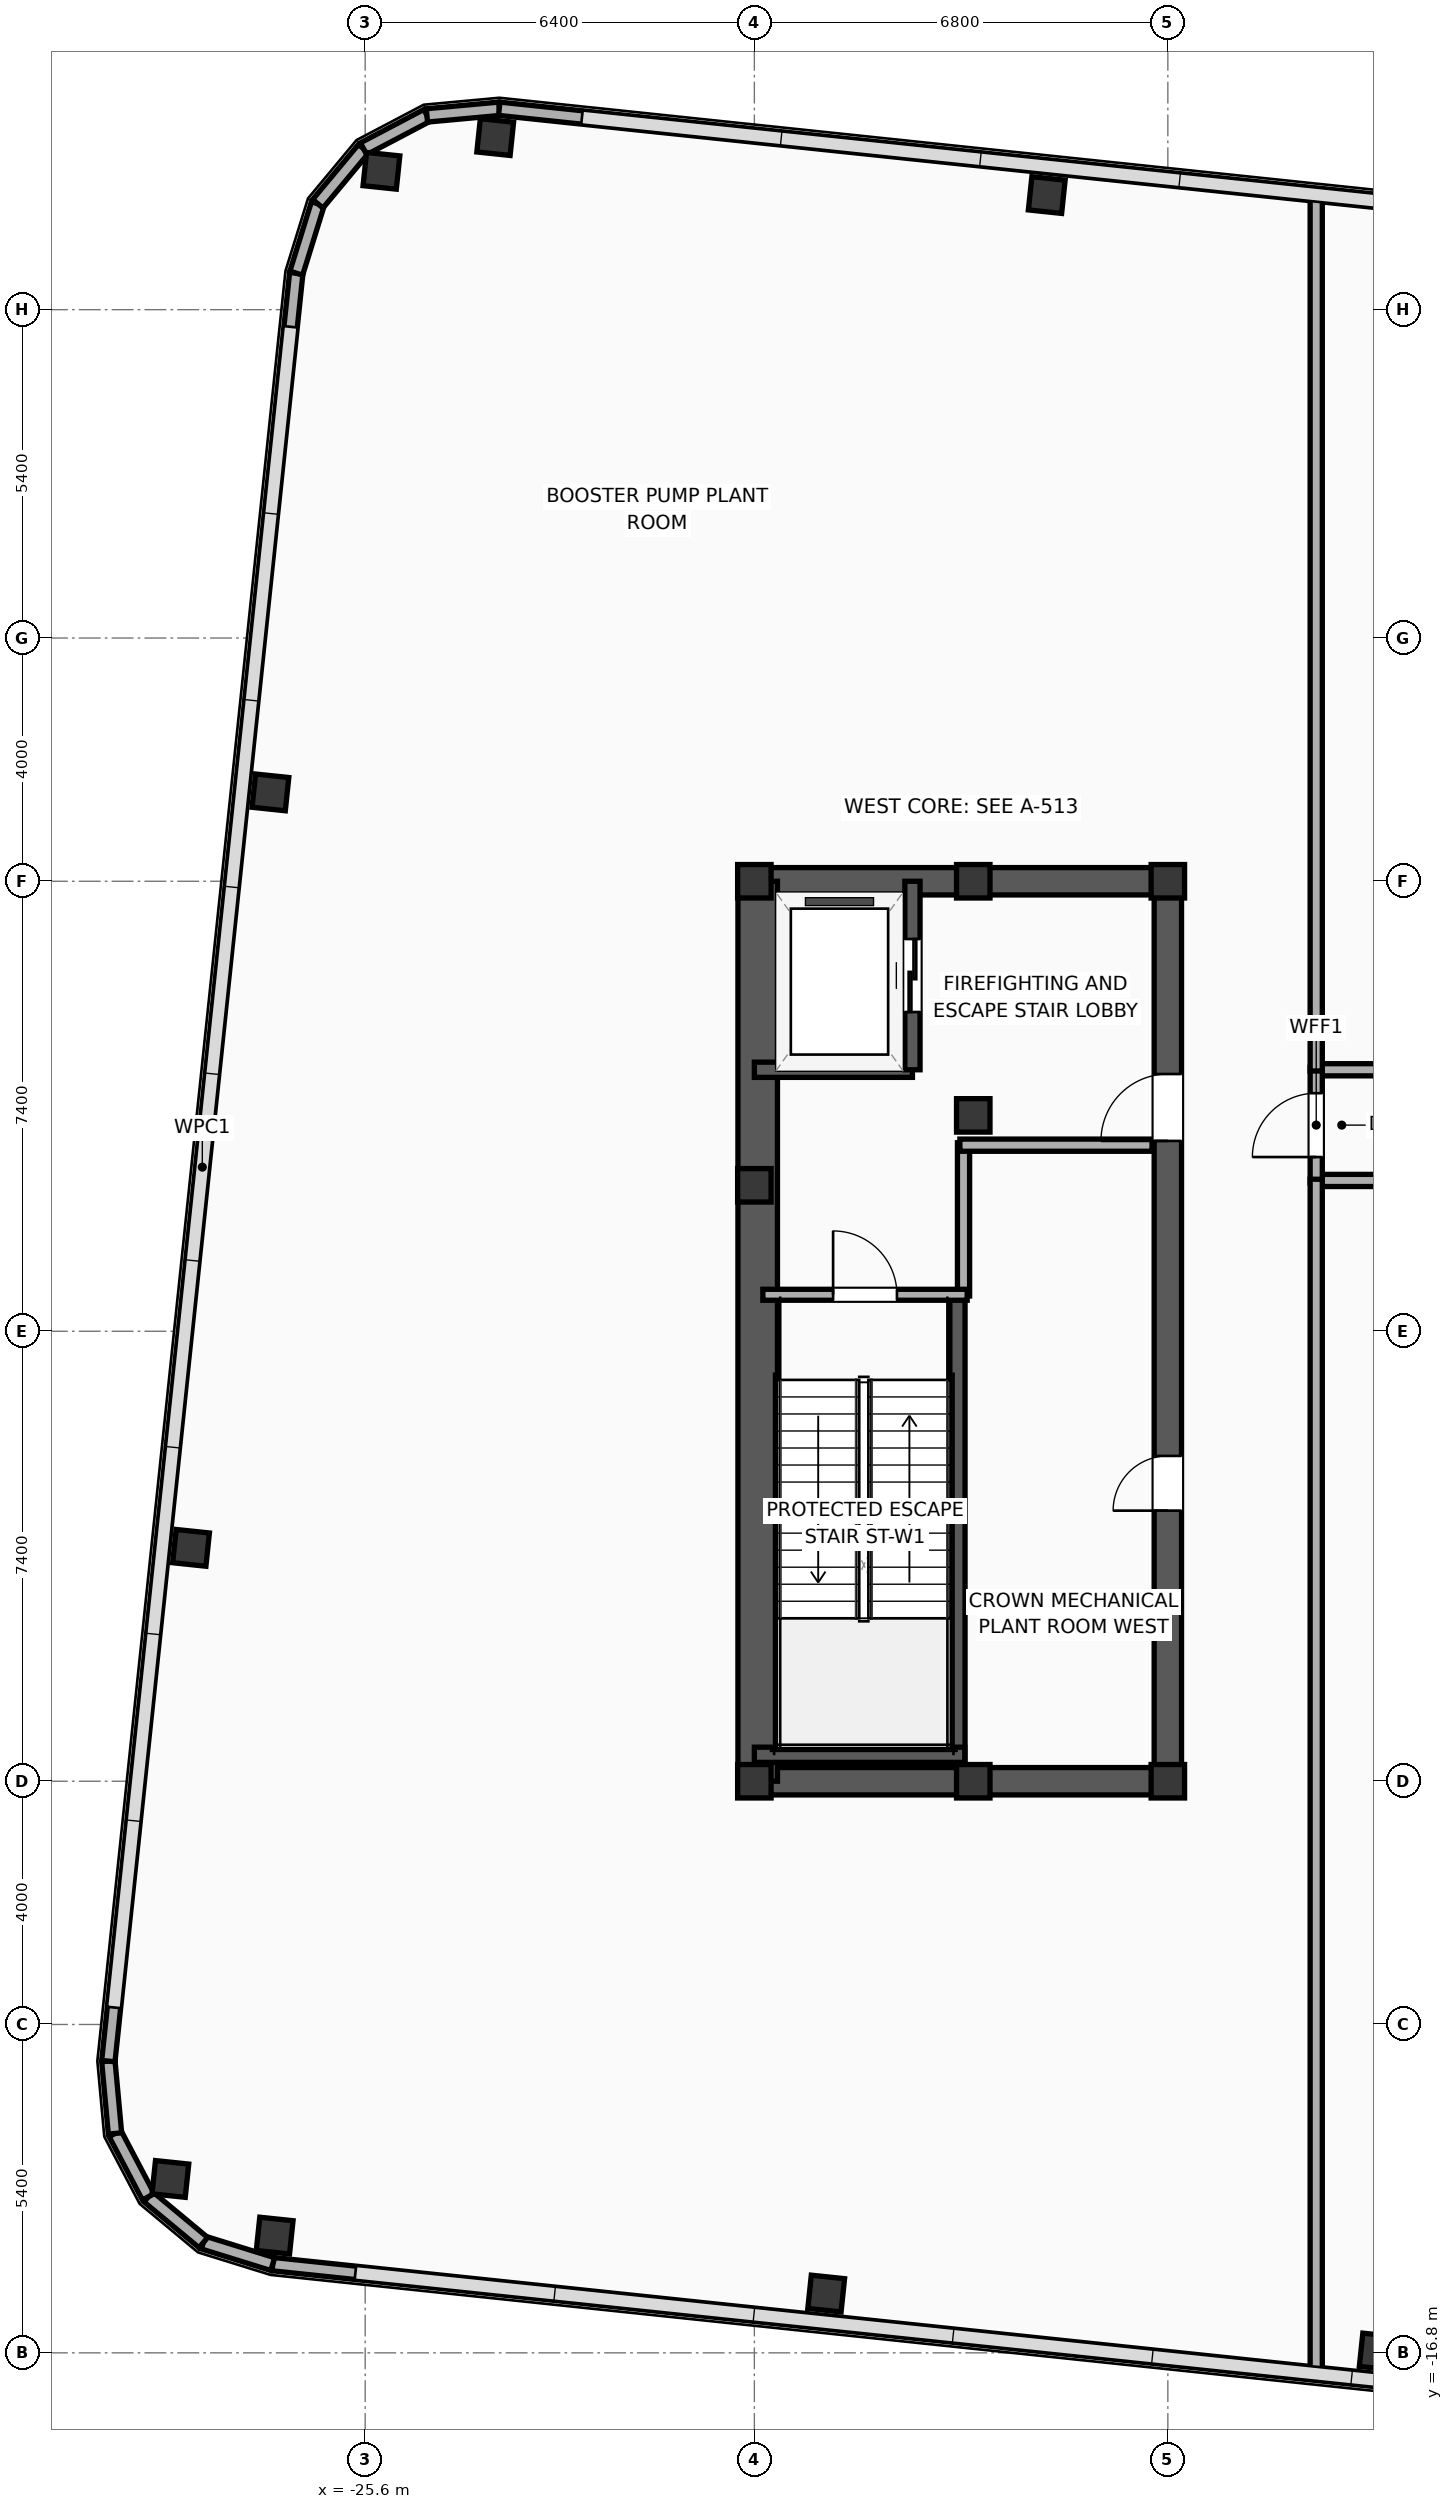
"""IFC4 building model, lengths in metres.
Left out: names, types, materials, properties, quantities, classifications, styles, units other than length and angle.
Written with IfcOpenShell. Run it as: python <this file> out.ifc"""

import sys

from ifc_helpers import new_model, si_unit, direction, frame, frame_2d, origin, origin_2d, place, context, subcontext, project, spatial, rectangle, hollow_rectangle, extrude, element, fill, save


model = new_model("IFC4")
c1 = context("Model", 3, precision=1e-05, world=origin(), true_north=direction((0.0, 1.0)))
c2 = subcontext(c1, "Body", "Model", "MODEL_VIEW")
j1 = project(units=[si_unit("LENGTHUNIT", "METRE"), si_unit("PLANEANGLEUNIT", "RADIAN")], contexts=[c1])
p1 = place(None, origin())
s1 = spatial("IfcSite", under=j1, at=p1, CompositionType="ELEMENT")
p2 = place(p1, origin())
s2 = spatial("IfcBuilding", under=s1, at=p2, CompositionType="ELEMENT")
p3 = place(p2, frame((0.0, 0.0, 321.3)))
s3 = spatial("IfcBuildingStorey", under=s2, at=p3, CompositionType="ELEMENT", Elevation=321.3)
for number, where, z_axis, x_axis in (
    (1, (-19.2, -7.4, 0.0), (0.0, 0.0, 1.0), (1.0, 0.0, 0.0)),
    (2, (-19.2, 2.4, 0.0), (0.0, 0.0, 1.0), (1.0, 0.0, 0.0)),
    (3, (-19.2, 7.4, 0.0), (0.0, 0.0, 1.0), (1.0, 0.0, 0.0)),
    (4, (-15.6, -7.4, 0.0), (0.0, 0.0, 1.0), (1.0, 0.0, 0.0)),
    (5, (-15.6, 7.4, 0.0), (0.0, 0.0, 1.0), (1.0, 0.0, 0.0)),
    (6, (-12.4, -7.4, 0.0), (0.0, 0.0, 1.0), (1.0, 0.0, 0.0)),
    (7, (-15.6, 3.55, 0.0), (0.0, 0.0, 1.0), (1.0, 0.0, 0.0)),
    (8, (-12.4, 7.4, 0.0), (0.0, 0.0, 1.0), (1.0, 0.0, 0.0)),
):
    element("IfcColumn", number, at=place(p3, frame(where, z_axis=z_axis, x_axis=x_axis)), inside=s3, PredefinedType="COLUMN", context=c2, shape_type="SweptSolid", body=[
        extrude(hollow_rectangle(XDim=0.55, YDim=0.55, WallThickness=0.022, at=origin_2d()), origin(), (0.0, 0.0, 1.0), 5.3),
    ])
for number, where, z_axis, x_axis in (
    (9, (-19.425, -7.4, 0.0), (0.0, 0.0, 1.0), (1.0, 0.0, 0.0)),
    (10, (-19.425, 7.4, 0.0), (0.0, 0.0, 1.0), (1.0, 0.0, 0.0)),
):
    element("IfcWall", number, at=place(p3, frame(where, z_axis=z_axis, x_axis=x_axis)), inside=s3, PredefinedType="SHEAR", context=c2, shape_type="SweptSolid", body=[
        extrude(rectangle(XDim=7.25, YDim=0.45, at=frame_2d((3.625, 0.0))), origin(), (0.0, 0.0, 1.0), 5.025),
    ])
p4 = place(p3, frame((-19.145, -7.4, 0.0), z_axis=(0.0, 0.0, 1.0), x_axis=(0.0, 1.0, 0.0)))
e11 = element("IfcWall", 11, at=p4, inside=s3, PredefinedType="SHEAR", context=c2, shape_type="SweptSolid", body=[
    extrude(rectangle(XDim=14.8, YDim=0.65, at=frame_2d((7.4, 0.0))), origin(), (0.0, 0.0, 1.0), 5.025),
])
p5 = place(p3, frame((-12.4, -7.4, 0.0), z_axis=(0.0, 0.0, 1.0), x_axis=(0.0, 1.0, 0.0)))
e12 = element("IfcWall", 12, at=p5, inside=s3, PredefinedType="SHEAR", context=c2, shape_type="SweptSolid", body=[
    extrude(rectangle(XDim=14.8, YDim=0.45, at=frame_2d((7.4, 0.0))), origin(), (0.0, 0.0, 1.0), 5.025),
])
p6 = place(p5, frame((10.53, 0.0, 0.0)))
e13 = element("IfcOpeningElement", 13, at=p6, cuts=e12, PredefinedType="OPENING", context=c2, shape_type="SweptSolid", body=[
    extrude(rectangle(XDim=1.1, YDim=2.05, at=frame_2d((0.55, 1.025))), frame((0.0, 0.235, 0.0), z_axis=(0.0, -1.0, 0.0), x_axis=(1.0, 0.0, 0.0)), (0.0, 0.0, 1.0), 0.47),
])
p7 = place(p5, frame((4.45, 0.0, 0.0)))
e14 = element("IfcOpeningElement", 14, at=p7, cuts=e12, PredefinedType="OPENING", context=c2, shape_type="SweptSolid", body=[
    extrude(rectangle(XDim=0.9, YDim=2.05, at=frame_2d((0.45, 1.025))), frame((0.0, 0.235, 0.0), z_axis=(0.0, -1.0, 0.0), x_axis=(1.0, 0.0, 0.0)), (0.0, 0.0, 1.0), 0.47),
])
p8 = place(p3, frame((-15.86, -7.085, 0.0), z_axis=(0.0, 0.0, 1.0), x_axis=(0.0, 1.0, 0.0)))
e15 = element("IfcWall", 15, at=p8, inside=s3, PredefinedType="SOLIDWALL", context=c2, shape_type="SweptSolid", body=[
    extrude(rectangle(XDim=7.685, YDim=0.25, at=frame_2d((3.843, 0.0))), origin(), (0.0, 0.0, 1.0), 5.025),
])
p9 = place(p3, frame((-19.2, -6.965, 0.0), z_axis=(0.0, 0.0, 1.0), x_axis=(1.0, 0.0, 0.0)))
e16 = element("IfcWall", 16, at=p9, inside=s3, PredefinedType="SOLIDWALL", context=c2, shape_type="SweptSolid", body=[
    extrude(rectangle(XDim=3.46, YDim=0.25, at=frame_2d((1.73, 0.0))), origin(), (0.0, 0.0, 1.0), 5.025),
])
for number, where, z_axis, x_axis in (
    (17, (-27.089, -14.872, 0.0), (0.0, 0.0, 1.0), (0.995, -0.105, 0.0)),
    (18, (-18.019, -15.825, 0.0), (0.0, 0.0, 1.0), (0.995, -0.105, 0.0)),
    (19, (-8.948, -16.778, 0.0), (0.0, 0.0, 1.0), (0.995, -0.105, 0.0)),
    (20, (-14.392, 18.685, 0.0), (0.0, 0.0, 1.0), (0.995, -0.105, 0.0)),
    (21, (-23.461, 19.638, 0.0), (0.0, 0.0, 1.0), (0.995, -0.105, 0.0)),
    (22, (-25.333, 19.084, 0.0), (0.0, 0.0, 1.0), (0.995, -0.105, 0.0)),
    (23, (-27.158, 8.862, 0.0), (0.0, 0.0, 1.0), (0.995, -0.105, 0.0)),
    (24, (-28.464, -3.562, 0.0), (0.0, 0.0, 1.0), (0.995, -0.105, 0.0)),
    (25, (-28.804, -13.94, 0.0), (0.0, 0.0, 1.0), (0.995, -0.105, 0.0)),
):
    element("IfcColumn", number, at=place(p3, frame(where, z_axis=z_axis, x_axis=x_axis)), inside=s3, PredefinedType="COLUMN", context=c2, shape_type="SweptSolid", body=[
        extrude(hollow_rectangle(XDim=0.55, YDim=0.55, WallThickness=0.022, at=origin_2d()), origin(), (0.0, 0.0, 1.0), 5.3),
    ])
p10 = place(p3, frame((18.195, -20.104, 0.0), z_axis=(0.0, 0.0, 1.0), x_axis=(-0.994522116558, 0.104526358762, 0.0)))
e26 = element("IfcWall", 26, at=p10, inside=s3, PredefinedType="PARAPET", context=c2, shape_type="SweptSolid", body=[
    extrude(rectangle(XDim=45.564, YDim=0.22, at=frame_2d((22.782, 0.0))), origin(), (0.0, 0.0, 1.0), 1.2),
])
p11 = place(p3, frame((-27.12, -15.341, 0.0), z_axis=(0.0, 0.0, 1.0), x_axis=(-0.95499831015, 0.296611239858, 0.0)))
e27 = element("IfcWall", 27, at=p11, inside=s3, PredefinedType="PARAPET", context=c2, shape_type="SweptSolid", body=[
    extrude(rectangle(XDim=1.195, YDim=0.22, at=frame_2d((0.598, 0.0))), origin(), (0.0, 0.0, 1.0), 1.2),
])
p12 = place(p3, frame((-28.261, -14.987, 0.0), z_axis=(0.0, 0.0, 1.0), x_axis=(-0.768849923601, 0.639429272852, 0.0)))
e28 = element("IfcWall", 28, at=p12, inside=s3, PredefinedType="PARAPET", context=c2, shape_type="SweptSolid", body=[
    extrude(rectangle(XDim=1.177, YDim=0.22, at=frame_2d((0.588, 0.0))), origin(), (0.0, 0.0, 1.0), 1.2),
])
p13 = place(p3, frame((-29.167, -14.234, 0.0), z_axis=(0.0, 0.0, 1.0), x_axis=(-0.46554120999, 0.885026204019, 0.0)))
e29 = element("IfcWall", 29, at=p13, inside=s3, PredefinedType="PARAPET", context=c2, shape_type="SweptSolid", body=[
    extrude(rectangle(XDim=1.177, YDim=0.22, at=frame_2d((0.588, 0.0))), origin(), (0.0, 0.0, 1.0), 1.2),
])
p14 = place(p3, frame((-29.714, -13.192, 0.0), z_axis=(0.0, 0.0, 1.0), x_axis=(-0.091530451467, 0.995802277791, 0.0)))
e30 = element("IfcWall", 30, at=p14, inside=s3, PredefinedType="PARAPET", context=c2, shape_type="SweptSolid", body=[
    extrude(rectangle(XDim=1.195, YDim=0.22, at=frame_2d((0.598, 0.0))), origin(), (0.0, 0.0, 1.0), 1.2),
])
p15 = place(p3, frame((-29.824, -12.002, 0.0), z_axis=(0.0, 0.0, 1.0), x_axis=(0.104528313262, 0.994521911134, 0.0)))
e31 = element("IfcWall", 31, at=p15, inside=s3, PredefinedType="PARAPET", context=c2, shape_type="SweptSolid", body=[
    extrude(rectangle(XDim=29.564, YDim=0.22, at=frame_2d((14.782, 0.0))), origin(), (0.0, 0.0, 1.0), 1.2),
])
p16 = place(p3, frame((-26.733, 17.4, 0.0), z_axis=(0.0, 0.0, 1.0), x_axis=(0.296611239858, 0.95499831015, 0.0)))
e32 = element("IfcWall", 32, at=p16, inside=s3, PredefinedType="PARAPET", context=c2, shape_type="SweptSolid", body=[
    extrude(rectangle(XDim=1.195, YDim=0.22, at=frame_2d((0.598, 0.0))), origin(), (0.0, 0.0, 1.0), 1.2),
])
p17 = place(p3, frame((-26.379, 18.542, 0.0), z_axis=(0.0, 0.0, 1.0), x_axis=(0.639408628756, 0.768867092203, 0.0)))
e33 = element("IfcWall", 33, at=p17, inside=s3, PredefinedType="PARAPET", context=c2, shape_type="SweptSolid", body=[
    extrude(rectangle(XDim=1.177, YDim=0.22, at=frame_2d((0.588, 0.0))), origin(), (0.0, 0.0, 1.0), 1.2),
])
p18 = place(p3, frame((-25.626, 19.446, 0.0), z_axis=(0.0, 0.0, 1.0), x_axis=(0.884985697578, 0.465618207421, 0.0)))
e34 = element("IfcWall", 34, at=p18, inside=s3, PredefinedType="PARAPET", context=c2, shape_type="SweptSolid", body=[
    extrude(rectangle(XDim=1.177, YDim=0.22, at=frame_2d((0.589, 0.0))), origin(), (0.0, 0.0, 1.0), 1.2),
])
p19 = place(p3, frame((-24.585, 19.994, 0.0), z_axis=(0.0, 0.0, 1.0), x_axis=(0.995802277791, 0.091530451467, 0.0)))
e35 = element("IfcWall", 35, at=p19, inside=s3, PredefinedType="PARAPET", context=c2, shape_type="SweptSolid", body=[
    extrude(rectangle(XDim=1.195, YDim=0.22, at=frame_2d((0.598, 0.0))), origin(), (0.0, 0.0, 1.0), 1.2),
])
p20 = place(p3, frame((-23.395, 20.104, 0.0), z_axis=(0.0, 0.0, 1.0), x_axis=(0.994522116558, -0.104526358762, 0.0)))
e36 = element("IfcWall", 36, at=p20, inside=s3, PredefinedType="PARAPET", context=c2, shape_type="SweptSolid", body=[
    extrude(rectangle(XDim=45.564, YDim=0.22, at=frame_2d((22.782, 0.0))), origin(), (0.0, 0.0, 1.0), 1.2),
])
p21 = place(p3, frame((-19.2, 4.3, 0.0), z_axis=(0.0, 0.0, 1.0), x_axis=(1.0, 0.0, 0.0)))
e37 = element("IfcWall", 37, at=p21, inside=s3, PredefinedType="SOLIDWALL", context=c2, shape_type="SweptSolid", body=[
    extrude(rectangle(XDim=2.6, YDim=0.25, at=frame_2d((1.3, 0.0))), origin(), (0.0, 0.0, 1.0), 5.025),
])
p22 = place(p3, frame((-16.6, 4.3, 0.0), z_axis=(0.0, 0.0, 1.0), x_axis=(0.0, 1.0, 0.0)))
e38 = element("IfcWall", 38, at=p22, inside=s3, PredefinedType="SOLIDWALL", context=c2, shape_type="SweptSolid", body=[
    extrude(rectangle(XDim=3.1, YDim=0.25, at=frame_2d((1.55, 0.0))), origin(), (0.0, 0.0, 1.0), 5.025),
])
p23 = place(p22, frame((0.95, 0.0, 0.0)))
e39 = element("IfcOpeningElement", 39, at=p23, cuts=e38, PredefinedType="OPENING", context=c2, shape_type="SweptSolid", body=[
    extrude(rectangle(XDim=1.2, YDim=2.05, at=frame_2d((0.6, 1.025))), frame((0.0, 0.135, 0.0), z_axis=(0.0, -1.0, 0.0), x_axis=(1.0, 0.0, 0.0)), (0.0, 0.0, 1.0), 0.27),
])
p24 = place(p3, frame((-15.76, 0.58, 0.0), z_axis=(0.0, 0.0, 1.0), x_axis=(0.0, 1.0, 0.0)))
e40 = element("IfcWall", 40, at=p24, inside=s3, PredefinedType="PARTITIONING", context=c2, shape_type="SweptSolid", body=[
    extrude(rectangle(XDim=2.52, YDim=0.2, at=frame_2d((1.26, 0.0))), origin(), (0.0, 0.0, 1.0), 5.025),
])
p25 = place(p3, frame((-15.82, 3.06, 0.0), z_axis=(0.0, 0.0, 1.0), x_axis=(1.0, 0.0, 0.0)))
e41 = element("IfcWall", 41, at=p25, inside=s3, PredefinedType="PARTITIONING", context=c2, shape_type="SweptSolid", body=[
    extrude(rectangle(XDim=3.16, YDim=0.2, at=frame_2d((1.58, 0.0))), origin(), (0.0, 0.0, 1.0), 5.025),
])
p26 = place(p3, frame((-19.06, 0.6, 0.0), z_axis=(0.0, 0.0, 1.0), x_axis=(1.0, 0.0, 0.0)))
e42 = element("IfcWall", 42, at=p26, inside=s3, PredefinedType="PARTITIONING", context=c2, shape_type="SweptSolid", body=[
    extrude(rectangle(XDim=3.36, YDim=0.18, at=frame_2d((1.68, 0.0))), origin(), (0.0, 0.0, 1.0), 5.025),
])
p27 = place(p26, frame((1.155, 0.0, 0.0)))
e43 = element("IfcOpeningElement", 43, at=p27, cuts=e42, PredefinedType="OPENING", context=c2, shape_type="SweptSolid", body=[
    extrude(rectangle(XDim=1.05, YDim=2.05, at=frame_2d((0.525, 1.025))), frame((0.0, 0.1, 0.0), z_axis=(0.0, -1.0, 0.0), x_axis=(1.0, 0.0, 0.0)), (0.0, 0.0, 1.0), 0.2),
])
p28 = place(p3, frame((-9.98, 2.48, 0.0), z_axis=(0.0, 0.0, 1.0), x_axis=(1.0, 0.0, 0.0)))
e44 = element("IfcWall", 44, at=p28, inside=s3, PredefinedType="PARTITIONING", context=c2, shape_type="SweptSolid", body=[
    extrude(rectangle(XDim=19.96, YDim=0.2, at=frame_2d((9.98, 0.0))), origin(), (0.0, 0.0, 1.0), 4.595),
])
p29 = place(p28, frame((9.28, 0.0, 0.0)))
e45 = element("IfcOpeningElement", 45, at=p29, cuts=e44, PredefinedType="OPENING", context=c2, shape_type="SweptSolid", body=[
    extrude(rectangle(XDim=1.4, YDim=2.05, at=frame_2d((0.7, 1.025))), frame((0.0, 0.11, 0.0), z_axis=(0.0, -1.0, 0.0), x_axis=(1.0, 0.0, 0.0)), (0.0, 0.0, 1.0), 0.22),
])
p30 = place(p3, frame((-9.98, 4.3, 0.0), z_axis=(0.0, 0.0, 1.0), x_axis=(1.0, 0.0, 0.0)))
e46 = element("IfcWall", 46, at=p30, inside=s3, PredefinedType="PARTITIONING", context=c2, shape_type="SweptSolid", body=[
    extrude(rectangle(XDim=19.96, YDim=0.2, at=frame_2d((9.98, 0.0))), origin(), (0.0, 0.0, 1.0), 5.025),
])
p31 = place(p30, frame((9.28, 0.0, 0.0)))
e47 = element("IfcOpeningElement", 47, at=p31, cuts=e46, PredefinedType="OPENING", context=c2, shape_type="SweptSolid", body=[
    extrude(rectangle(XDim=1.4, YDim=2.05, at=frame_2d((0.7, 1.025))), frame((0.0, 0.11, 0.0), z_axis=(0.0, -1.0, 0.0), x_axis=(1.0, 0.0, 0.0)), (0.0, 0.0, 1.0), 0.22),
])
p32 = place(p3, frame((-9.96, 2.44, 0.0), z_axis=(0.0, 0.0, 1.0), x_axis=(0.0, 1.0, 0.0)))
e48 = element("IfcWall", 48, at=p32, inside=s3, PredefinedType="PARTITIONING", context=c2, shape_type="SweptSolid", body=[
    extrude(rectangle(XDim=1.9, YDim=0.2, at=frame_2d((0.95, 0.0))), origin(), (0.0, 0.0, 1.0), 5.025),
])
p33 = place(p32, frame((0.425, 0.0, 0.0)))
e49 = element("IfcOpeningElement", 49, at=p33, cuts=e48, PredefinedType="OPENING", context=c2, shape_type="SweptSolid", body=[
    extrude(rectangle(XDim=1.05, YDim=2.05, at=frame_2d((0.525, 1.025))), frame((0.0, 0.11, 0.0), z_axis=(0.0, -1.0, 0.0), x_axis=(1.0, 0.0, 0.0)), (0.0, 0.0, 1.0), 0.22),
])
p34 = place(p3, frame((-9.96, -17.125, 0.0), z_axis=(0.0, 0.0, 1.0), x_axis=(0.0, 1.0, 0.0)))
e50 = element("IfcWall", 50, at=p34, inside=s3, PredefinedType="PARTITIONING", context=c2, shape_type="SweptSolid", body=[
    extrude(rectangle(XDim=19.625, YDim=0.2, at=frame_2d((9.812, 0.0))), origin(), (0.0, 0.0, 1.0), 4.465),
])
p35 = place(p3, frame((-9.96, 4.28, 0.0), z_axis=(0.0, 0.0, 1.0), x_axis=(0.0, 1.0, 0.0)))
e51 = element("IfcWall", 51, at=p35, inside=s3, PredefinedType="PARTITIONING", context=c2, shape_type="SweptSolid", body=[
    extrude(rectangle(XDim=14.392, YDim=0.2, at=frame_2d((7.196, 0.0))), origin(), (0.0, 0.0, 1.0), 5.025),
])
p36 = place(p23, origin())
e52 = element("IfcDoor", 52, at=p36, inside=s3, OperationType="SLIDING_TO_LEFT", PredefinedType="DOOR", context=c2, shape_type="SweptSolid", body=[
    extrude(rectangle(XDim=1.2, YDim=2.05, at=frame_2d((0.6, 1.025))), frame((0.0, 0.025, 0.0), z_axis=(0.0, -1.0, 0.0), x_axis=(1.0, 0.0, 0.0)), (0.0, 0.0, 1.0), 0.05),
])
fill(e39, e52)
p37 = place(p27, origin())
e53 = element("IfcDoor", 53, at=p37, inside=s3, OperationType="SINGLE_SWING_LEFT", PredefinedType="DOOR", context=c2, shape_type="SweptSolid", body=[
    extrude(rectangle(XDim=1.05, YDim=2.05, at=frame_2d((0.525, 1.025))), frame((0.0, 0.025, 0.0), z_axis=(0.0, -1.0, 0.0), x_axis=(1.0, 0.0, 0.0)), (0.0, 0.0, 1.0), 0.05),
])
fill(e43, e53)
p38 = place(p33, origin())
e54 = element("IfcDoor", 54, at=p38, inside=s3, OperationType="SINGLE_SWING_LEFT", PredefinedType="DOOR", context=c2, shape_type="SweptSolid", body=[
    extrude(rectangle(XDim=1.05, YDim=2.05, at=frame_2d((0.525, 1.025))), frame((0.0, 0.025, 0.0), z_axis=(0.0, -1.0, 0.0), x_axis=(1.0, 0.0, 0.0)), (0.0, 0.0, 1.0), 0.05),
])
fill(e49, e54)
p39 = place(p6, origin())
e55 = element("IfcDoor", 55, at=p39, inside=s3, OperationType="SINGLE_SWING_LEFT", PredefinedType="DOOR", context=c2, shape_type="SweptSolid", body=[
    extrude(rectangle(XDim=1.1, YDim=2.05, at=frame_2d((0.55, 1.025))), frame((0.0, 0.025, 0.0), z_axis=(0.0, -1.0, 0.0), x_axis=(1.0, 0.0, 0.0)), (0.0, 0.0, 1.0), 0.05),
])
fill(e13, e55)
p40 = place(p7, origin())
e56 = element("IfcDoor", 56, at=p40, inside=s3, OperationType="SINGLE_SWING_LEFT", PredefinedType="DOOR", context=c2, shape_type="SweptSolid", body=[
    extrude(rectangle(XDim=0.9, YDim=2.05, at=frame_2d((0.45, 1.025))), frame((0.0, 0.025, 0.0), z_axis=(0.0, -1.0, 0.0), x_axis=(1.0, 0.0, 0.0)), (0.0, 0.0, 1.0), 0.05),
])
fill(e14, e56)
save(model, sys.argv[1])
